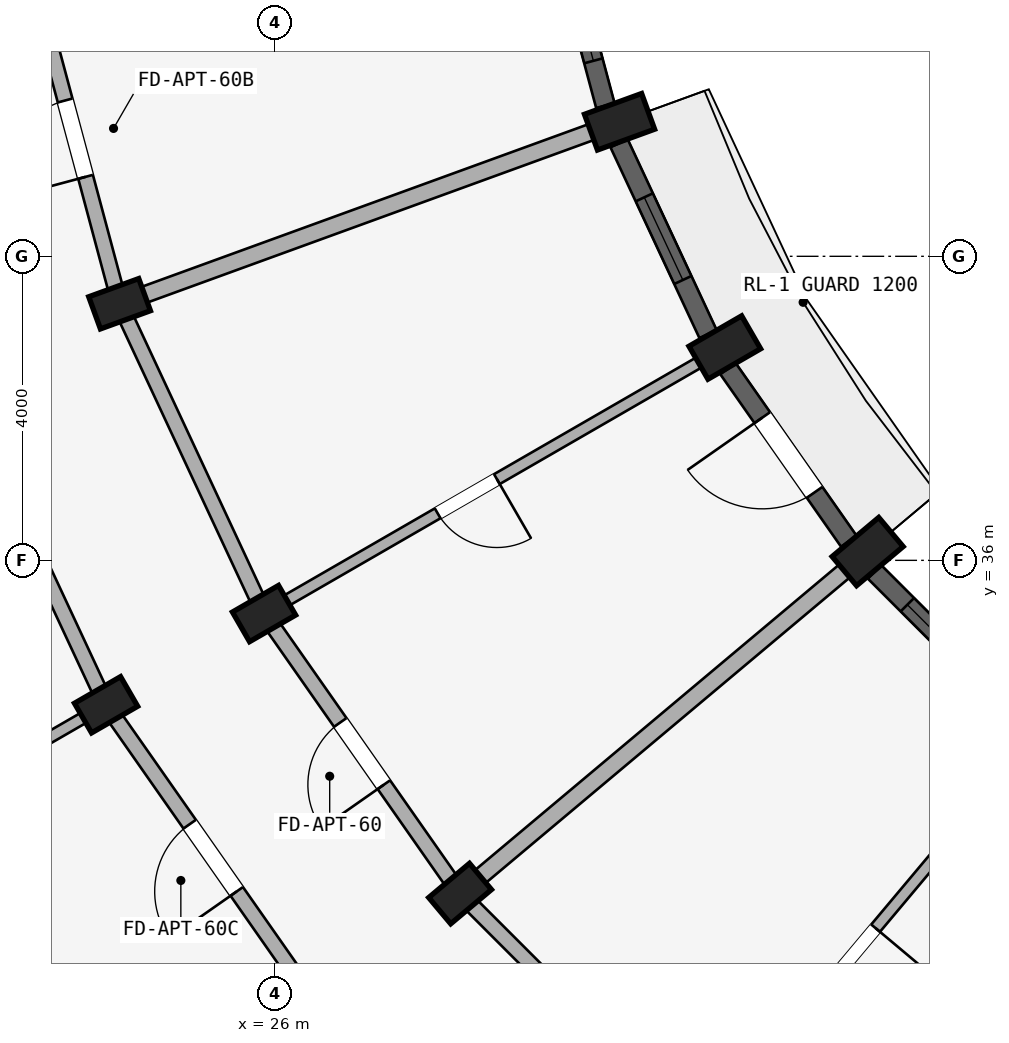
"""IFC4 building model, lengths in metres.
Left out: names, types, materials, properties, quantities, classifications, styles, units other than length and angle.
Written with IfcOpenShell. Run it as: python <this file> out.ifc"""

import sys

from ifc_helpers import new_model, si_unit, direction, frame, frame_2d, origin, origin_2d, place, context, subcontext, project, spatial, rectangle, extrude, element, fill, save


model = new_model("IFC4")
c1 = context("Model", 3, precision=1e-05, world=origin(), true_north=direction((0.0, 1.0)))
c2 = subcontext(c1, "Body", "Model", "MODEL_VIEW")
j1 = project(units=[si_unit("LENGTHUNIT", "METRE"), si_unit("PLANEANGLEUNIT", "RADIAN")], contexts=[c1])
p1 = place(None, origin())
s1 = spatial("IfcSite", under=j1, at=p1, CompositionType="ELEMENT")
p2 = place(p1, origin())
s2 = spatial("IfcBuilding", under=s1, at=p2, CompositionType="ELEMENT")
p3 = place(p2, frame((0.0, 0.0, 18.15)))
s3 = spatial("IfcBuildingStorey", under=s2, at=p3, CompositionType="ELEMENT", Elevation=18.15)
p4 = place(p3, frame((33.798, 36.115, 0.0), z_axis=(0.0, 0.0, 1.0), x_axis=(-0.642787609687, 0.766044443119, 0.0)))
e1 = element("IfcColumn", 1, at=p4, inside=s3, PredefinedType="COLUMN", context=c2, shape_type="SweptSolid", body=[
    extrude(rectangle(XDim=0.5, YDim=0.8, at=origin_2d()), origin(), (0.0, 0.0, 1.0), 2.93),
])
p5 = place(p3, frame((28.436, 31.616, 0.0), z_axis=(0.0, 0.0, 1.0), x_axis=(-0.642787609687, 0.766044443119, 0.0)))
e2 = element("IfcColumn", 2, at=p5, inside=s3, PredefinedType="COLUMN", context=c2, shape_type="SweptSolid", body=[
    extrude(rectangle(XDim=0.45, YDim=0.7, at=origin_2d()), origin(), (0.0, 0.0, 1.0), 2.93),
])
p6 = place(p3, frame((31.919, 38.8, 0.0), z_axis=(0.0, 0.0, 1.0), x_axis=(-0.5, 0.866025403784, 0.0)))
e3 = element("IfcColumn", 3, at=p6, inside=s3, PredefinedType="COLUMN", context=c2, shape_type="SweptSolid", body=[
    extrude(rectangle(XDim=0.5, YDim=0.8, at=origin_2d()), origin(), (0.0, 0.0, 1.0), 2.93),
])
for number, where, z_axis, x_axis in (
    (4, (25.856, 35.3, 0.0), (0.0, 0.0, 1.0), (-0.5, 0.866, 0.0)),
    (5, (23.778, 34.1, 0.0), (0.0, 0.0, 1.0), (-0.5, 0.866, 0.0)),
):
    element("IfcColumn", number, at=place(p3, frame(where, z_axis=z_axis, x_axis=x_axis)), inside=s3, PredefinedType="COLUMN", context=c2, shape_type="SweptSolid", body=[
        extrude(rectangle(XDim=0.45, YDim=0.7, at=origin_2d()), origin(), (0.0, 0.0, 1.0), 2.93),
    ])
p7 = place(p3, frame((30.534, 41.77, 0.0), z_axis=(0.0, 0.0, 1.0), x_axis=(-0.342020143326, 0.939692620786, 0.0)))
e6 = element("IfcColumn", 6, at=p7, inside=s3, PredefinedType="COLUMN", context=c2, shape_type="SweptSolid", body=[
    extrude(rectangle(XDim=0.5, YDim=0.8, at=origin_2d()), origin(), (0.0, 0.0, 1.0), 2.93),
])
p8 = place(p3, frame((23.956, 39.376, 0.0), z_axis=(0.0, 0.0, 1.0), x_axis=(-0.342020143326, 0.939692620786, 0.0)))
e7 = element("IfcColumn", 7, at=p8, inside=s3, PredefinedType="COLUMN", context=c2, shape_type="SweptSolid", body=[
    extrude(rectangle(XDim=0.45, YDim=0.7, at=origin_2d()), origin(), (0.0, 0.0, 1.0), 2.93),
])
p9 = place(p3, frame((31.616, 28.436, 0.0), z_axis=(0.0, 0.0, 1.0), x_axis=(-0.707106781187, 0.707106781187, 0.0)))
e8 = element("IfcWall", 8, at=p9, inside=s3, PredefinedType="STANDARD", context=c2, shape_type="SweptSolid", body=[
    extrude(rectangle(XDim=4.497, YDim=0.2, at=frame_2d((2.249, 0.0))), origin(), (0.0, 0.0, 1.0), 2.372),
])
p10 = place(p3, frame((28.436, 31.616, 0.0), z_axis=(0.0, 0.0, 1.0), x_axis=(-0.573571637217, 0.819155404658, 0.0)))
e9 = element("IfcWall", 9, at=p10, inside=s3, PredefinedType="STANDARD", context=c2, shape_type="SweptSolid", body=[
    extrude(rectangle(XDim=4.497, YDim=0.2, at=frame_2d((2.249, 0.0))), origin(), (0.0, 0.0, 1.0), 2.372),
])
p11 = place(p10, frame((1.749, 0.0, 0.0)))
e10 = element("IfcOpeningElement", 10, at=p11, cuts=e9, PredefinedType="OPENING", context=c2, shape_type="SweptSolid", body=[
    extrude(rectangle(XDim=1.0, YDim=2.15, at=frame_2d((0.5, 1.075))), frame((0.0, 0.11, 0.0), z_axis=(0.0, -1.0, 0.0), x_axis=(1.0, 0.0, 0.0)), (0.0, 0.0, 1.0), 0.22),
])
p12 = place(p3, frame((26.598, 30.073, 0.0), z_axis=(0.0, 0.0, 1.0), x_axis=(-0.573592335331, 0.819140911474, 0.0)))
e11 = element("IfcWall", 11, at=p12, inside=s3, PredefinedType="STANDARD", context=c2, shape_type="SweptSolid", body=[
    extrude(rectangle(XDim=4.916, YDim=0.2, at=frame_2d((2.458, 0.0))), origin(), (0.0, 0.0, 1.0), 2.372),
])
p13 = place(p12, frame((1.918, 0.0, 0.0)))
e12 = element("IfcOpeningElement", 12, at=p13, cuts=e11, PredefinedType="OPENING", context=c2, shape_type="SweptSolid", body=[
    extrude(rectangle(XDim=1.08, YDim=2.15, at=frame_2d((0.54, 1.075))), frame((0.0, 0.11, 0.0), z_axis=(0.0, -1.0, 0.0), x_axis=(1.0, 0.0, 0.0)), (0.0, 0.0, 1.0), 0.22),
])
p14 = place(p3, frame((25.856, 35.3, 0.0), z_axis=(0.0, 0.0, 1.0), x_axis=(-0.422617978463, 0.906307919131, 0.0)))
e13 = element("IfcWall", 13, at=p14, inside=s3, PredefinedType="STANDARD", context=c2, shape_type="SweptSolid", body=[
    extrude(rectangle(XDim=4.497, YDim=0.2, at=frame_2d((2.249, 0.0))), origin(), (0.0, 0.0, 1.0), 2.372),
])
p15 = place(p3, frame((23.778, 34.1, 0.0), z_axis=(0.0, 0.0, 1.0), x_axis=(-0.422629854778, 0.906302381024, 0.0)))
e14 = element("IfcWall", 14, at=p15, inside=s3, PredefinedType="STANDARD", context=c2, shape_type="SweptSolid", body=[
    extrude(rectangle(XDim=4.915, YDim=0.2, at=frame_2d((2.458, 0.0))), origin(), (0.0, 0.0, 1.0), 2.372),
])
p16 = place(p3, frame((23.956, 39.376, 0.0), z_axis=(0.0, 0.0, 1.0), x_axis=(-0.258787642463, 0.965934240054, 0.0)))
e15 = element("IfcWall", 15, at=p16, inside=s3, PredefinedType="STANDARD", context=c2, shape_type="SweptSolid", body=[
    extrude(rectangle(XDim=4.497, YDim=0.2, at=frame_2d((2.249, 0.0))), origin(), (0.0, 0.0, 1.0), 2.372),
])
p17 = place(p16, frame((1.729, 0.0, 0.0)))
e16 = element("IfcOpeningElement", 16, at=p17, cuts=e15, PredefinedType="OPENING", context=c2, shape_type="SweptSolid", body=[
    extrude(rectangle(XDim=1.04, YDim=2.15, at=frame_2d((0.52, 1.075))), frame((0.0, 0.11, 0.0), z_axis=(0.0, -1.0, 0.0), x_axis=(1.0, 0.0, 0.0)), (0.0, 0.0, 1.0), 0.22),
])
p18 = place(p3, frame((35.987, 33.645, 0.0), z_axis=(0.0, 0.0, 1.0), x_axis=(-0.642784846501, -0.766046761698, 0.0)))
e17 = element("IfcWall", 17, at=p18, inside=s3, PredefinedType="PARTITIONING", context=c2, shape_type="SweptSolid", body=[
    extrude(rectangle(XDim=6.75, YDim=0.15, at=frame_2d((3.375, 0.0))), origin(), (0.0, 0.0, 1.0), 2.372),
])
p19 = place(p18, frame((3.242, 0.0, 0.0)))
e18 = element("IfcOpeningElement", 18, at=p19, cuts=e17, PredefinedType="OPENING", context=c2, shape_type="SweptSolid", body=[
    extrude(rectangle(XDim=0.94, YDim=2.1, at=frame_2d((0.47, 1.05))), frame((0.0, 0.085, 0.0), z_axis=(0.0, -1.0, 0.0), x_axis=(1.0, 0.0, 0.0)), (0.0, 0.0, 1.0), 0.17),
])
p20 = place(p3, frame((33.645, 35.987, 0.0), z_axis=(0.0, 0.0, 1.0), x_axis=(-0.766046761698, -0.642784846501, 0.0)))
e19 = element("IfcWall", 19, at=p20, inside=s3, PredefinedType="STANDARD", context=c2, shape_type="SweptSolid", body=[
    extrude(rectangle(XDim=6.75, YDim=0.22, at=frame_2d((3.375, 0.0))), origin(), (0.0, 0.0, 1.0), 2.372),
])
p21 = place(p3, frame((31.746, 38.7, 0.0), z_axis=(0.0, 0.0, 1.0), x_axis=(-0.866026575979, -0.499997969693, 0.0)))
e20 = element("IfcWall", 20, at=p21, inside=s3, PredefinedType="PARTITIONING", context=c2, shape_type="SweptSolid", body=[
    extrude(rectangle(XDim=6.75, YDim=0.15, at=frame_2d((3.375, 0.0))), origin(), (0.0, 0.0, 1.0), 2.372),
])
p22 = place(p21, frame((3.262, 0.0, 0.0)))
e21 = element("IfcOpeningElement", 21, at=p22, cuts=e20, PredefinedType="OPENING", context=c2, shape_type="SweptSolid", body=[
    extrude(rectangle(XDim=0.9, YDim=2.1, at=frame_2d((0.45, 1.05))), frame((0.0, 0.085, 0.0), z_axis=(0.0, -1.0, 0.0), x_axis=(1.0, 0.0, 0.0)), (0.0, 0.0, 1.0), 0.17),
])
p23 = place(p3, frame((23.691, 34.05, 0.0), z_axis=(0.0, 0.0, 1.0), x_axis=(-0.866026648973, -0.499997843263, 0.0)))
e22 = element("IfcWall", 22, at=p23, inside=s3, PredefinedType="PARTITIONING", context=c2, shape_type="SweptSolid", body=[
    extrude(rectangle(XDim=17.42, YDim=0.15, at=frame_2d((8.71, 0.0))), origin(), (0.0, 0.0, 1.0), 2.372),
])
p24 = place(p23, frame((4.45, 0.0, 0.0)))
e23 = element("IfcOpeningElement", 23, at=p24, cuts=e22, PredefinedType="OPENING", context=c2, shape_type="SweptSolid", body=[
    extrude(rectangle(XDim=0.8, YDim=2.1, at=frame_2d((0.4, 1.05))), frame((0.0, 0.085, 0.0), z_axis=(0.0, -1.0, 0.0), x_axis=(1.0, 0.0, 0.0)), (0.0, 0.0, 1.0), 0.17),
])
p25 = place(p3, frame((30.346, 41.702, 0.0), z_axis=(0.0, 0.0, 1.0), x_axis=(-0.939696231917, -0.342010221662, 0.0)))
e24 = element("IfcWall", 24, at=p25, inside=s3, PredefinedType="STANDARD", context=c2, shape_type="SweptSolid", body=[
    extrude(rectangle(XDim=6.75, YDim=0.22, at=frame_2d((3.375, 0.0))), origin(), (0.0, 0.0, 1.0), 2.372),
])
p26 = place(p3, frame((35.848, 33.889, 0.0), z_axis=(0.0, 0.0, 1.0), x_axis=(-0.707106781187, 0.707106781187, 0.0)))
e25 = element("IfcWall", 25, at=p26, inside=s3, PredefinedType="STANDARD", context=c2, shape_type="SweptSolid", body=[
    extrude(rectangle(XDim=2.77, YDim=0.25, at=frame_2d((1.385, 0.0))), origin(), (0.0, 0.0, 1.0), 2.422),
])
p27 = place(p26, frame((0.61, 0.0, 0.622)))
e26 = element("IfcOpeningElement", 26, at=p27, cuts=e25, PredefinedType="OPENING", context=c2, shape_type="SweptSolid", body=[
    extrude(rectangle(XDim=1.55, YDim=1.6, at=frame_2d((0.775, 0.8))), frame((0.0, 0.135, 0.0), z_axis=(0.0, -1.0, 0.0), x_axis=(1.0, 0.0, 0.0)), (0.0, 0.0, 1.0), 0.27),
])
p28 = place(p3, frame((33.551, 36.252, 0.0), z_axis=(0.0, 0.0, 1.0), x_axis=(-0.573633885053, 0.819111815273, 0.0)))
e27 = element("IfcWall", 27, at=p28, inside=s3, PredefinedType="STANDARD", context=c2, shape_type="SweptSolid", body=[
    extrude(rectangle(XDim=2.77, YDim=0.25, at=frame_2d((1.385, 0.0))), origin(), (0.0, 0.0, 1.0), 2.422),
])
p29 = place(p28, frame((0.785, 0.0, 0.0)))
e28 = element("IfcOpeningElement", 28, at=p29, cuts=e27, PredefinedType="OPENING", context=c2, shape_type="SweptSolid", body=[
    extrude(rectangle(XDim=1.2, YDim=2.15, at=frame_2d((0.6, 1.075))), frame((0.0, 0.135, 0.0), z_axis=(0.0, -1.0, 0.0), x_axis=(1.0, 0.0, 0.0)), (0.0, 0.0, 1.0), 0.27),
])
p30 = place(p3, frame((31.698, 38.977, 0.0), z_axis=(0.0, 0.0, 1.0), x_axis=(-0.422649007088, 0.906293449611, 0.0)))
e29 = element("IfcWall", 29, at=p30, inside=s3, PredefinedType="STANDARD", context=c2, shape_type="SweptSolid", body=[
    extrude(rectangle(XDim=2.77, YDim=0.25, at=frame_2d((1.385, 0.0))), origin(), (0.0, 0.0, 1.0), 2.422),
])
p31 = place(p30, frame((0.785, 0.0, 0.722)))
e30 = element("IfcOpeningElement", 30, at=p31, cuts=e29, PredefinedType="OPENING", context=c2, shape_type="SweptSolid", body=[
    extrude(rectangle(XDim=1.2, YDim=1.5, at=frame_2d((0.6, 0.75))), frame((0.0, 0.135, 0.0), z_axis=(0.0, -1.0, 0.0), x_axis=(1.0, 0.0, 0.0)), (0.0, 0.0, 1.0), 0.27),
])
p32 = place(p3, frame((30.347, 41.983, 0.0), z_axis=(0.0, 0.0, 1.0), x_axis=(-0.25878161084, 0.965935855992, 0.0)))
e31 = element("IfcWall", 31, at=p32, inside=s3, PredefinedType="STANDARD", context=c2, shape_type="SweptSolid", body=[
    extrude(rectangle(XDim=2.77, YDim=0.25, at=frame_2d((1.385, 0.0))), origin(), (0.0, 0.0, 1.0), 2.422),
])
p33 = place(p32, frame((0.61, 0.0, 0.622)))
e32 = element("IfcOpeningElement", 32, at=p33, cuts=e31, PredefinedType="OPENING", context=c2, shape_type="SweptSolid", body=[
    extrude(rectangle(XDim=1.55, YDim=1.6, at=frame_2d((0.775, 0.8))), frame((0.0, 0.135, 0.0), z_axis=(0.0, -1.0, 0.0), x_axis=(1.0, 0.0, 0.0)), (0.0, 0.0, 1.0), 0.27),
])
p34 = place(p27, origin())
e33 = element("IfcWindow", 33, at=p34, inside=s3, PartitioningType="DOUBLE_PANEL_VERTICAL", PredefinedType="WINDOW", context=c2, shape_type="SweptSolid", body=[
    extrude(rectangle(XDim=1.55, YDim=1.6, at=frame_2d((0.775, 0.8))), frame((0.0, 0.03, 0.0), z_axis=(0.0, -1.0, 0.0), x_axis=(1.0, 0.0, 0.0)), (0.0, 0.0, 1.0), 0.06),
])
fill(e26, e33)
p35 = place(p31, origin())
e34 = element("IfcWindow", 34, at=p35, inside=s3, PartitioningType="SINGLE_PANEL", PredefinedType="WINDOW", context=c2, shape_type="SweptSolid", body=[
    extrude(rectangle(XDim=1.2, YDim=1.5, at=frame_2d((0.6, 0.75))), frame((0.0, 0.03, 0.0), z_axis=(0.0, -1.0, 0.0), x_axis=(1.0, 0.0, 0.0)), (0.0, 0.0, 1.0), 0.06),
])
fill(e30, e34)
p36 = place(p33, origin())
e35 = element("IfcWindow", 35, at=p36, inside=s3, PartitioningType="DOUBLE_PANEL_VERTICAL", PredefinedType="WINDOW", context=c2, shape_type="SweptSolid", body=[
    extrude(rectangle(XDim=1.55, YDim=1.6, at=frame_2d((0.775, 0.8))), frame((0.0, 0.03, 0.0), z_axis=(0.0, -1.0, 0.0), x_axis=(1.0, 0.0, 0.0)), (0.0, 0.0, 1.0), 0.06),
])
fill(e32, e35)
p37 = place(p19, origin())
e36 = element("IfcDoor", 36, at=p37, inside=s3, OperationType="SINGLE_SWING_LEFT", PredefinedType="DOOR", context=c2, shape_type="SweptSolid", body=[
    extrude(rectangle(XDim=0.94, YDim=2.1, at=frame_2d((0.47, 1.05))), frame((0.0, 0.025, 0.0), z_axis=(0.0, -1.0, 0.0), x_axis=(1.0, 0.0, 0.0)), (0.0, 0.0, 1.0), 0.05),
])
fill(e18, e36)
p38 = place(p22, origin())
e37 = element("IfcDoor", 37, at=p38, inside=s3, OperationType="SINGLE_SWING_LEFT", PredefinedType="DOOR", context=c2, shape_type="SweptSolid", body=[
    extrude(rectangle(XDim=0.9, YDim=2.1, at=frame_2d((0.45, 1.05))), frame((0.0, 0.025, 0.0), z_axis=(0.0, -1.0, 0.0), x_axis=(1.0, 0.0, 0.0)), (0.0, 0.0, 1.0), 0.05),
])
fill(e21, e37)
p39 = place(p13, frame((1.08, 0.0, 0.0), z_axis=(0.0, 0.0, 1.0), x_axis=(-1.0, 0.0, 0.0)))
e38 = element("IfcDoor", 38, at=p39, inside=s3, OperationType="SINGLE_SWING_RIGHT", PredefinedType="DOOR", context=c2, shape_type="SweptSolid", body=[
    extrude(rectangle(XDim=1.08, YDim=2.15, at=frame_2d((0.54, 1.075))), frame((0.0, 0.025, 0.0), z_axis=(0.0, -1.0, 0.0), x_axis=(1.0, 0.0, 0.0)), (0.0, 0.0, 1.0), 0.05),
])
fill(e12, e38)
p40 = place(p11, frame((1.0, 0.0, 0.0), z_axis=(0.0, 0.0, 1.0), x_axis=(-1.0, 0.0, 0.0)))
e39 = element("IfcDoor", 39, at=p40, inside=s3, OperationType="SINGLE_SWING_RIGHT", PredefinedType="DOOR", context=c2, shape_type="SweptSolid", body=[
    extrude(rectangle(XDim=1.0, YDim=2.15, at=frame_2d((0.5, 1.075))), frame((0.0, 0.025, 0.0), z_axis=(0.0, -1.0, 0.0), x_axis=(1.0, 0.0, 0.0)), (0.0, 0.0, 1.0), 0.05),
])
fill(e10, e39)
p41 = place(p17, origin())
e40 = element("IfcDoor", 40, at=p41, inside=s3, OperationType="SINGLE_SWING_LEFT", PredefinedType="DOOR", context=c2, shape_type="SweptSolid", body=[
    extrude(rectangle(XDim=1.04, YDim=2.15, at=frame_2d((0.52, 1.075))), frame((0.0, 0.025, 0.0), z_axis=(0.0, -1.0, 0.0), x_axis=(1.0, 0.0, 0.0)), (0.0, 0.0, 1.0), 0.05),
])
fill(e16, e40)
p42 = place(p29, frame((1.2, 0.0, 0.0), z_axis=(0.0, 0.0, 1.0), x_axis=(-1.0, 0.0, 0.0)))
e41 = element("IfcDoor", 41, at=p42, inside=s3, OperationType="SINGLE_SWING_LEFT", PredefinedType="DOOR", context=c2, shape_type="SweptSolid", body=[
    extrude(rectangle(XDim=1.2, YDim=2.15, at=frame_2d((0.6, 1.075))), frame((0.0, 0.025, 0.0), z_axis=(0.0, -1.0, 0.0), x_axis=(1.0, 0.0, 0.0)), (0.0, 0.0, 1.0), 0.05),
])
fill(e28, e41)
save(model, sys.argv[1])
